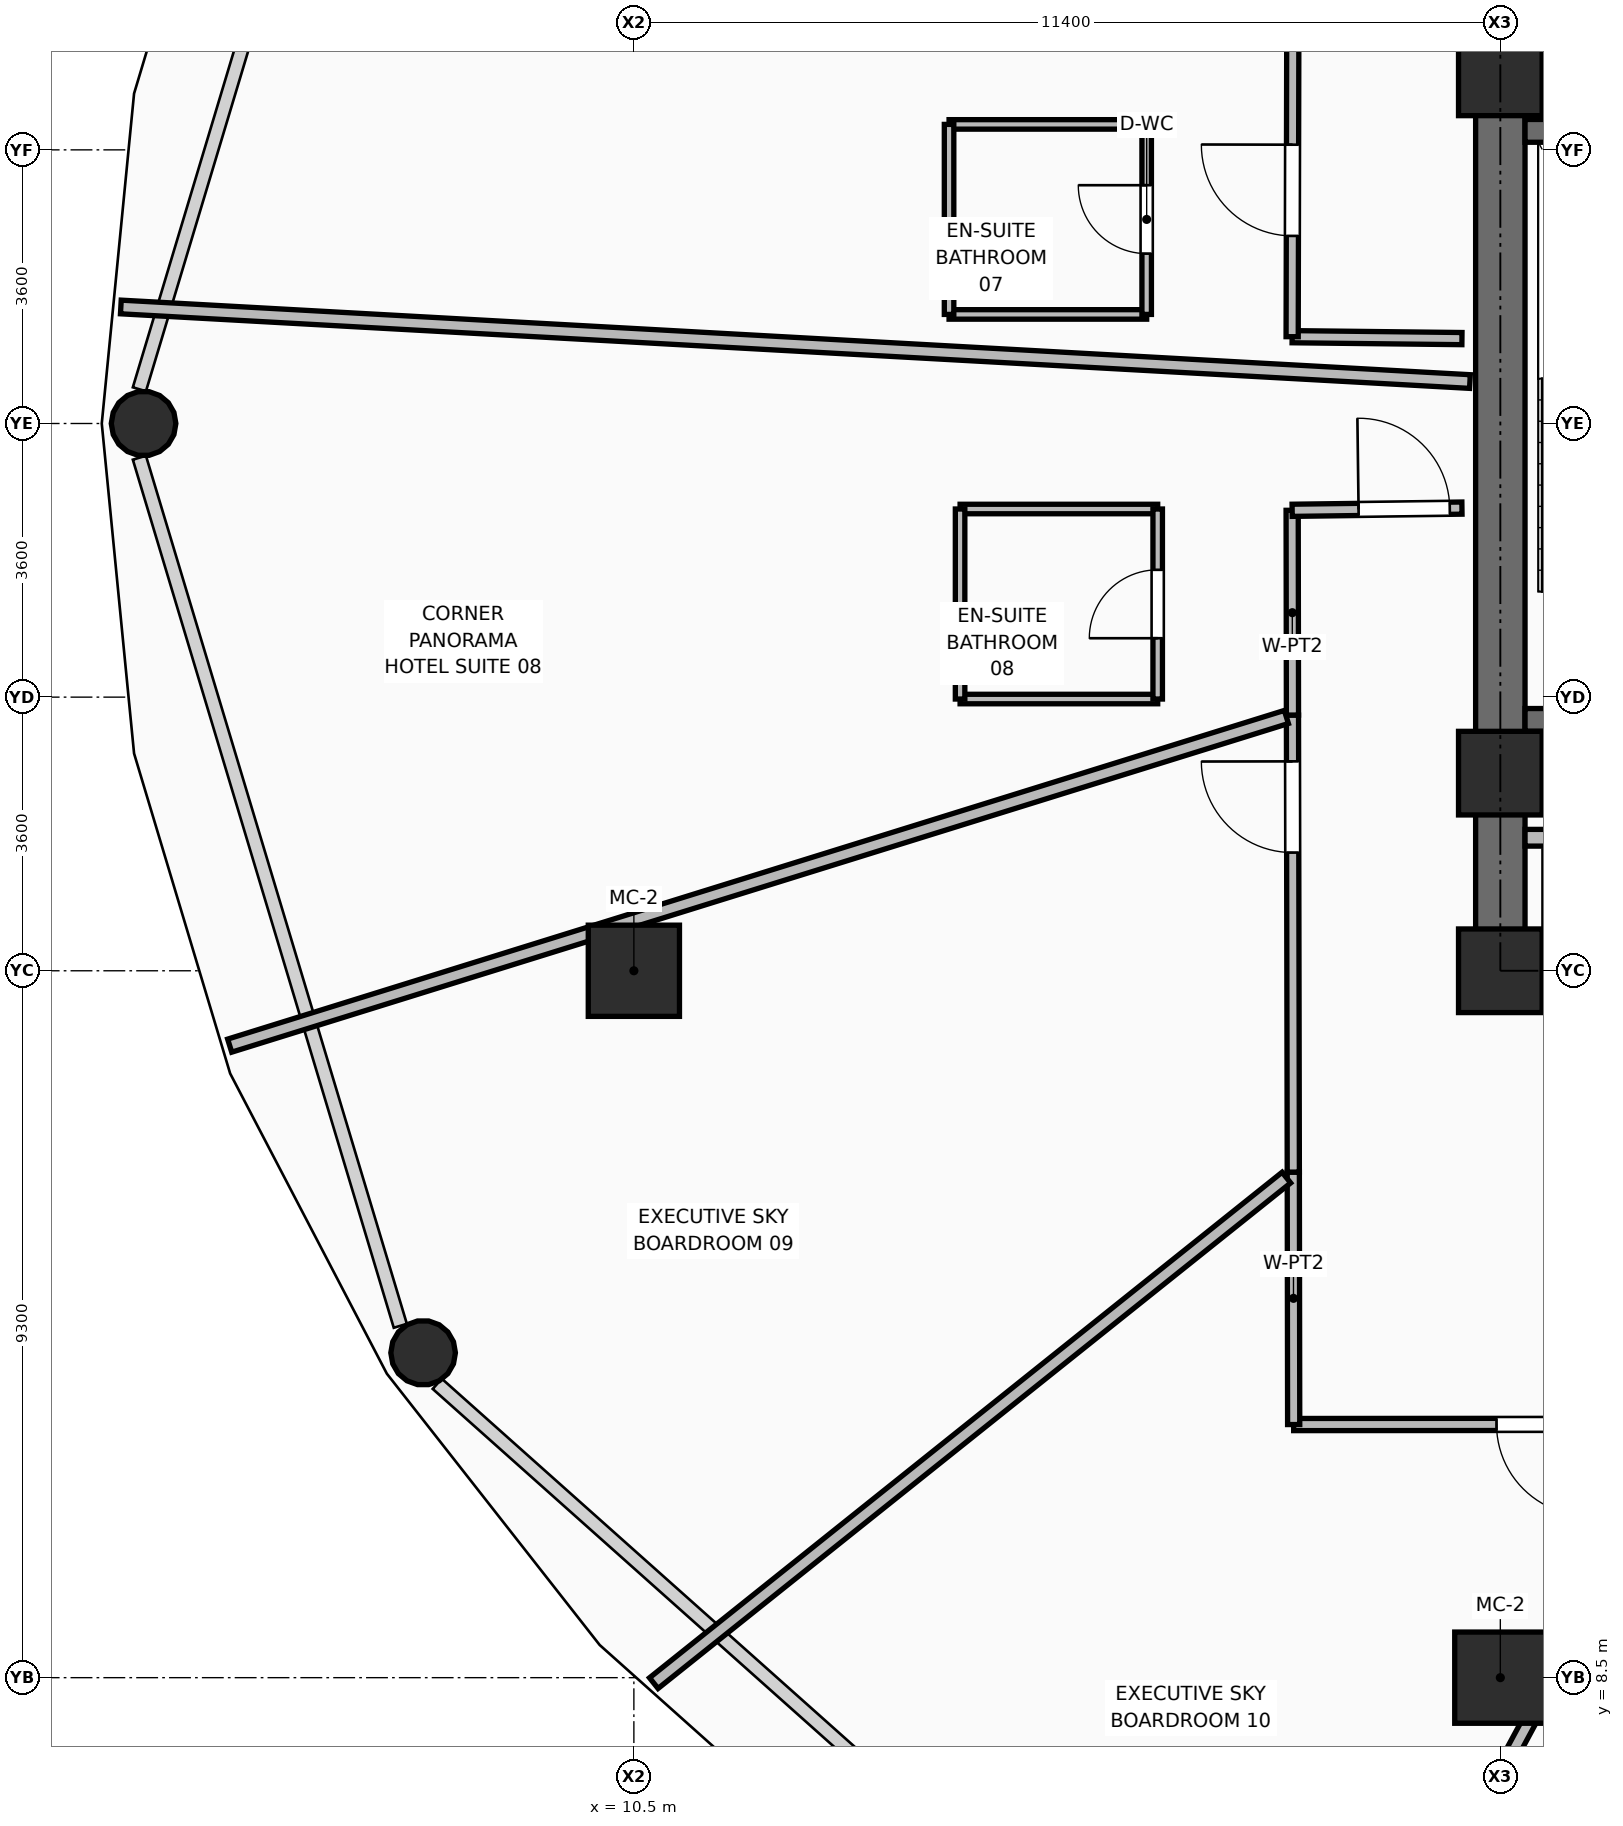
"""IFC4 building model, lengths in metres.
Left out: names, types, materials, properties, quantities, classifications, styles, units other than length and angle.
Written with IfcOpenShell. Run it as: python <this file> out.ifc"""

import sys

from ifc_helpers import new_model, si_unit, direction, frame, frame_2d, origin, origin_2d, place, context, subcontext, project, spatial, rectangle, hollow_rectangle, hollow_circle, extrude, element, fill, save


model = new_model("IFC4")
c1 = context("Model", 3, precision=1e-05, world=origin(), true_north=direction((0.0, 1.0)))
c2 = subcontext(c1, "Body", "Model", "MODEL_VIEW")
j1 = project(units=[si_unit("LENGTHUNIT", "METRE"), si_unit("PLANEANGLEUNIT", "RADIAN")], contexts=[c1])
p1 = place(None, origin())
s1 = spatial("IfcSite", under=j1, at=p1, CompositionType="ELEMENT")
p2 = place(p1, origin())
s2 = spatial("IfcBuilding", under=s1, at=p2, CompositionType="ELEMENT")
p3 = place(p2, frame((0.0, 0.0, 60.75)))
s3 = spatial("IfcBuildingStorey", under=s2, at=p3, CompositionType="ELEMENT", Elevation=60.75)
for number, where, z_axis, x_axis in (
    (1, (21.9, 17.8, 0.0), (0.0, 0.0, 1.0), (1.0, 0.0, 0.0)),
    (2, (21.9, 20.4, 0.0), (0.0, 0.0, 1.0), (1.0, 0.0, 0.0)),
    (3, (21.9, 29.6, 0.0), (0.0, 0.0, 1.0), (1.0, 0.0, 0.0)),
):
    element("IfcColumn", number, at=place(p3, frame(where, z_axis=z_axis, x_axis=x_axis)), inside=s3, PredefinedType="COLUMN", context=c2, shape_type="SweptSolid", body=[
        extrude(rectangle(XDim=1.1, YDim=1.1, at=origin_2d()), origin(), (0.0, 0.0, 1.0), 3.75),
    ])
for number, where, z_axis, x_axis in (
    (4, (21.9, 8.5, 0.0), (0.0, 0.0, 1.0), (1.0, 0.0, 0.0)),
    (5, (10.5, 17.8, 0.0), (0.0, 0.0, 1.0), (1.0, 0.0, 0.0)),
):
    element("IfcColumn", number, at=place(p3, frame(where, z_axis=z_axis, x_axis=x_axis)), inside=s3, PredefinedType="COLUMN", context=c2, shape_type="SweptSolid", body=[
        extrude(hollow_rectangle(XDim=1.2, YDim=1.2, WallThickness=0.045, at=origin_2d()), origin(), (0.0, 0.0, 1.0), 3.75),
    ])
for number, where, z_axis, x_axis in (
    (6, (4.049, 25.0, 0.0), (0.0, 0.0, 1.0), (1.0, 0.0, 0.0)),
    (7, (7.727, 12.774, 0.0), (0.0, 0.0, 1.0), (1.0, 0.0, 0.0)),
):
    element("IfcColumn", number, at=place(p3, frame(where, z_axis=z_axis, x_axis=x_axis)), inside=s3, PredefinedType="COLUMN", context=c2, shape_type="SweptSolid", body=[
        extrude(hollow_circle(Radius=0.425, WallThickness=0.04, at=origin_2d()), origin(), (0.0, 0.0, 1.0), 3.57),
    ])
p4 = place(p3, frame((21.575, 17.8, 0.0), z_axis=(0.0, 0.0, 1.0), x_axis=(1.0, 0.0, 0.0)))
e8 = element("IfcWall", 8, at=p4, inside=s3, PredefinedType="SHEAR", context=c2, shape_type="SweptSolid", body=[
    extrude(rectangle(XDim=2.175, YDim=0.65, at=frame_2d((1.087, 0.0))), origin(), (0.0, 0.0, 1.0), 3.57),
])
p5 = place(p3, frame((21.9, 18.125, 0.0), z_axis=(0.0, 0.0, 1.0), x_axis=(0.0, 1.0, 0.0)))
e9 = element("IfcWall", 9, at=p5, inside=s3, PredefinedType="SHEAR", context=c2, shape_type="SweptSolid", body=[
    extrude(rectangle(XDim=14.0, YDim=0.65, at=frame_2d((7.0, 0.0))), origin(), (0.0, 0.0, 1.0), 3.57),
])
p6 = place(p3, frame((22.225, 21.1, 0.0), z_axis=(0.0, 0.0, 1.0), x_axis=(1.0, 0.0, 0.0)))
e10 = element("IfcWall", 10, at=p6, inside=s3, PredefinedType="SHEAR", context=c2, shape_type="SweptSolid", body=[
    extrude(rectangle(XDim=3.515, YDim=0.3, at=frame_2d((1.757, 0.0))), origin(), (0.0, 0.0, 1.0), 3.57),
])
p7 = place(p6, frame((1.995, 0.0, 0.0)))
e11 = element("IfcOpeningElement", 11, at=p7, cuts=e10, PredefinedType="OPENING", context=c2, shape_type="SweptSolid", body=[
    extrude(rectangle(XDim=1.05, YDim=2.1, at=frame_2d((0.525, 1.05))), frame((0.0, 0.16, 0.0), z_axis=(0.0, -1.0, 0.0), x_axis=(1.0, 0.0, 0.0)), (0.0, 0.0, 1.0), 0.32),
])
p8 = place(p3, frame((22.225, 28.85, 0.0), z_axis=(0.0, 0.0, 1.0), x_axis=(1.0, 0.0, 0.0)))
e12 = element("IfcWall", 12, at=p8, inside=s3, PredefinedType="SHEAR", context=c2, shape_type="SweptSolid", body=[
    extrude(rectangle(XDim=3.515, YDim=0.3, at=frame_2d((1.757, 0.0))), origin(), (0.0, 0.0, 1.0), 3.57),
])
p9 = place(p3, frame((22.225, 19.55, 0.0), z_axis=(0.0, 0.0, 1.0), x_axis=(1.0, 0.0, 0.0)))
e13 = element("IfcWall", 13, at=p9, inside=s3, PredefinedType="PARTITIONING", context=c2, shape_type="SweptSolid", body=[
    extrude(rectangle(XDim=1.565, YDim=0.22, at=frame_2d((0.782, 0.0))), origin(), (0.0, 0.0, 1.0), 2.595),
])
p10 = place(p3, frame((21.395, 26.117, 0.0), z_axis=(0.0, 0.0, 1.0), x_axis=(-0.999936661747, 0.011254887571, 0.0)))
e14 = element("IfcWall", 14, at=p10, inside=s3, PredefinedType="PARTITIONING", context=c2, shape_type="SweptSolid", body=[
    extrude(rectangle(XDim=2.234, YDim=0.16, at=frame_2d((1.117, 0.0))), origin(), (0.0, 0.0, 1.0), 3.55),
])
p11 = place(p3, frame((19.161, 26.142, 0.0), z_axis=(0.0, 0.0, 1.0), x_axis=(0.002105737748, 0.999997782932, 0.0)))
e15 = element("IfcWall", 15, at=p11, inside=s3, PredefinedType="PARTITIONING", context=c2, shape_type="SweptSolid", body=[
    extrude(rectangle(XDim=4.29, YDim=0.16, at=frame_2d((2.145, 0.0))), origin(), (0.0, 0.0, 1.0), 3.55),
])
p12 = place(p11, frame((1.326, 0.0, 0.0)))
e16 = element("IfcOpeningElement", 16, at=p12, cuts=e15, PredefinedType="OPENING", context=c2, shape_type="SweptSolid", body=[
    extrude(rectangle(XDim=1.2, YDim=2.1, at=frame_2d((0.6, 1.05))), frame((0.0, 0.09, 0.0), z_axis=(0.0, -1.0, 0.0), x_axis=(1.0, 0.0, 0.0)), (0.0, 0.0, 1.0), 0.18),
])
p13 = place(p3, frame((24.39, 11.833, 0.0), z_axis=(0.0, 0.0, 1.0), x_axis=(-0.999999841836, -0.000562429607, 0.0)))
e17 = element("IfcWall", 17, at=p13, inside=s3, PredefinedType="PARTITIONING", context=c2, shape_type="SweptSolid", body=[
    extrude(rectangle(XDim=5.209, YDim=0.16, at=frame_2d((2.604, 0.0))), origin(), (0.0, 0.0, 1.0), 2.928),
])
p14 = place(p13, frame((1.34, 0.0, 0.0)))
e18 = element("IfcOpeningElement", 18, at=p14, cuts=e17, PredefinedType="OPENING", context=c2, shape_type="SweptSolid", body=[
    extrude(rectangle(XDim=1.2, YDim=2.1, at=frame_2d((0.6, 1.05))), frame((0.0, 0.09, 0.0), z_axis=(0.0, -1.0, 0.0), x_axis=(1.0, 0.0, 0.0)), (0.0, 0.0, 1.0), 0.18),
])
p15 = place(p3, frame((19.181, 11.83, 0.0), z_axis=(0.0, 0.0, 1.0), x_axis=(-0.001470370415, 0.999998919005, 0.0)))
e19 = element("IfcWall", 19, at=p15, inside=s3, PredefinedType="PARTITIONING", context=c2, shape_type="SweptSolid", body=[
    extrude(rectangle(XDim=3.321, YDim=0.16, at=frame_2d((1.66, 0.0))), origin(), (0.0, 0.0, 1.0), 3.55),
])
p16 = place(p3, frame((19.176, 15.151, 0.0), z_axis=(0.0, 0.0, 1.0), x_axis=(-0.001827037145, 0.999998330966, 0.0)))
e20 = element("IfcWall", 20, at=p16, inside=s3, PredefinedType="PARTITIONING", context=c2, shape_type="SweptSolid", body=[
    extrude(rectangle(XDim=6.013, YDim=0.16, at=frame_2d((3.007, 0.0))), origin(), (0.0, 0.0, 1.0), 2.928),
])
p17 = place(p16, frame((4.204, 0.0, 0.0)))
e21 = element("IfcOpeningElement", 21, at=p17, cuts=e20, PredefinedType="OPENING", context=c2, shape_type="SweptSolid", body=[
    extrude(rectangle(XDim=1.2, YDim=2.1, at=frame_2d((0.6, 1.05))), frame((0.0, 0.09, 0.0), z_axis=(0.0, -1.0, 0.0), x_axis=(1.0, 0.0, 0.0)), (0.0, 0.0, 1.0), 0.18),
])
p18 = place(p3, frame((19.165, 21.164, 0.0), z_axis=(0.0, 0.0, 1.0), x_axis=(-0.001540690577, 0.999998813136, 0.0)))
e22 = element("IfcWall", 22, at=p18, inside=s3, PredefinedType="PARTITIONING", context=c2, shape_type="SweptSolid", body=[
    extrude(rectangle(XDim=2.694, YDim=0.16, at=frame_2d((1.347, 0.0))), origin(), (0.0, 0.0, 1.0), 2.928),
])
p19 = place(p3, frame((19.161, 23.858, 0.0), z_axis=(0.0, 0.0, 1.0), x_axis=(0.999915458151, 0.013002943888, 0.0)))
e23 = element("IfcWall", 23, at=p19, inside=s3, PredefinedType="PARTITIONING", context=c2, shape_type="SweptSolid", body=[
    extrude(rectangle(XDim=2.234, YDim=0.16, at=frame_2d((1.117, 0.0))), origin(), (0.0, 0.0, 1.0), 3.55),
])
p20 = place(p19, frame((0.874, 0.0, 0.0)))
e24 = element("IfcOpeningElement", 24, at=p20, cuts=e23, PredefinedType="OPENING", context=c2, shape_type="SweptSolid", body=[
    extrude(rectangle(XDim=1.2, YDim=2.1, at=frame_2d((0.6, 1.05))), frame((0.0, 0.09, 0.0), z_axis=(0.0, -1.0, 0.0), x_axis=(1.0, 0.0, 0.0)), (0.0, 0.0, 1.0), 0.18),
])
p21 = place(p3, frame((21.5, 25.552, 0.0), z_axis=(0.0, 0.0, 1.0), x_axis=(-0.998476368936, 0.055180981107, 0.0)))
e25 = element("IfcWall", 25, at=p21, inside=s3, PredefinedType="PARTITIONING", context=c2, shape_type="SweptSolid", body=[
    extrude(rectangle(XDim=17.777, YDim=0.18, at=frame_2d((8.889, 0.0))), origin(), (0.0, 0.0, 1.0), 2.595),
])
p22 = place(p3, frame((19.085, 21.139, 0.0), z_axis=(0.0, 0.0, 1.0), x_axis=(-0.954884570259, -0.296977200271, 0.0)))
e26 = element("IfcWall", 26, at=p22, inside=s3, PredefinedType="PARTITIONING", context=c2, shape_type="SweptSolid", body=[
    extrude(rectangle(XDim=14.56, YDim=0.18, at=frame_2d((7.28, 0.0))), origin(), (0.0, 0.0, 1.0), 2.775),
])
p23 = place(p3, frame((19.085, 15.079, 0.0), z_axis=(0.0, 0.0, 1.0), x_axis=(-0.781201807071, -0.624278572938, 0.0)))
e27 = element("IfcWall", 27, at=p23, inside=s3, PredefinedType="PARTITIONING", context=c2, shape_type="SweptSolid", body=[
    extrude(rectangle(XDim=10.654, YDim=0.18, at=frame_2d((5.327, 0.0))), origin(), (0.0, 0.0, 1.0), 2.775),
])
p24 = place(p3, frame((24.345, 11.75, 0.0), z_axis=(0.0, 0.0, 1.0), x_axis=(-0.475165367646, -0.879896512887, 0.0)))
e28 = element("IfcWall", 28, at=p24, inside=s3, PredefinedType="PARTITIONING", context=c2, shape_type="SweptSolid", body=[
    extrude(rectangle(XDim=10.34, YDim=0.18, at=frame_2d((5.17, 0.0))), origin(), (0.0, 0.0, 1.0), 2.775),
])
for number, where, z_axis, x_axis in (
    (29, (14.647, 26.435, 0.0), (0.0, 0.0, 1.0), (1.0, 0.0, 0.0)),
    (30, (14.647, 28.935, 0.0), (0.0, 0.0, 1.0), (1.0, 0.0, 0.0)),
):
    element("IfcWall", number, at=place(p3, frame(where, z_axis=z_axis, x_axis=x_axis)), inside=s3, PredefinedType="PARTITIONING", context=c2, shape_type="SweptSolid", body=[
        extrude(rectangle(XDim=2.6, YDim=0.125, at=frame_2d((1.3, 0.0))), origin(), (0.0, 0.0, 1.0), 3.55),
    ])
p25 = place(p3, frame((14.647, 26.435, 0.0), z_axis=(0.0, 0.0, 1.0), x_axis=(0.0, 1.0, 0.0)))
e31 = element("IfcWall", 31, at=p25, inside=s3, PredefinedType="PARTITIONING", context=c2, shape_type="SweptSolid", body=[
    extrude(rectangle(XDim=2.5, YDim=0.125, at=frame_2d((1.25, 0.0))), origin(), (0.0, 0.0, 1.0), 3.55),
])
p26 = place(p3, frame((17.247, 26.435, 0.0), z_axis=(0.0, 0.0, 1.0), x_axis=(0.0, 1.0, 0.0)))
e32 = element("IfcWall", 32, at=p26, inside=s3, PredefinedType="PARTITIONING", context=c2, shape_type="SweptSolid", body=[
    extrude(rectangle(XDim=2.5, YDim=0.125, at=frame_2d((1.25, 0.0))), origin(), (0.0, 0.0, 1.0), 3.55),
])
p27 = place(p26, frame((0.8, 0.0, 0.0)))
e33 = element("IfcOpeningElement", 33, at=p27, cuts=e32, PredefinedType="OPENING", context=c2, shape_type="SweptSolid", body=[
    extrude(rectangle(XDim=0.9, YDim=2.1, at=frame_2d((0.45, 1.05))), frame((0.0, 0.073, 0.0), z_axis=(0.0, -1.0, 0.0), x_axis=(1.0, 0.0, 0.0)), (0.0, 0.0, 1.0), 0.145),
])
p28 = place(p3, frame((14.792, 21.375, 0.0), z_axis=(0.0, 0.0, 1.0), x_axis=(1.0, 0.0, 0.0)))
e34 = element("IfcWall", 34, at=p28, inside=s3, PredefinedType="PARTITIONING", context=c2, shape_type="SweptSolid", body=[
    extrude(rectangle(XDim=2.6, YDim=0.125, at=frame_2d((1.3, 0.0))), origin(), (0.0, 0.0, 1.0), 2.928),
])
p29 = place(p3, frame((14.792, 23.875, 0.0), z_axis=(0.0, 0.0, 1.0), x_axis=(1.0, 0.0, 0.0)))
e35 = element("IfcWall", 35, at=p29, inside=s3, PredefinedType="PARTITIONING", context=c2, shape_type="SweptSolid", body=[
    extrude(rectangle(XDim=2.6, YDim=0.125, at=frame_2d((1.3, 0.0))), origin(), (0.0, 0.0, 1.0), 3.55),
])
p30 = place(p3, frame((14.792, 21.375, 0.0), z_axis=(0.0, 0.0, 1.0), x_axis=(0.0, 1.0, 0.0)))
e36 = element("IfcWall", 36, at=p30, inside=s3, PredefinedType="PARTITIONING", context=c2, shape_type="SweptSolid", body=[
    extrude(rectangle(XDim=2.5, YDim=0.125, at=frame_2d((1.25, 0.0))), origin(), (0.0, 0.0, 1.0), 2.928),
])
p31 = place(p3, frame((17.392, 21.375, 0.0), z_axis=(0.0, 0.0, 1.0), x_axis=(0.0, 1.0, 0.0)))
e37 = element("IfcWall", 37, at=p31, inside=s3, PredefinedType="PARTITIONING", context=c2, shape_type="SweptSolid", body=[
    extrude(rectangle(XDim=2.5, YDim=0.125, at=frame_2d((1.25, 0.0))), origin(), (0.0, 0.0, 1.0), 2.928),
])
p32 = place(p31, frame((0.8, 0.0, 0.0)))
e38 = element("IfcOpeningElement", 38, at=p32, cuts=e37, PredefinedType="OPENING", context=c2, shape_type="SweptSolid", body=[
    extrude(rectangle(XDim=0.9, YDim=2.1, at=frame_2d((0.45, 1.05))), frame((0.0, 0.073, 0.0), z_axis=(0.0, -1.0, 0.0), x_axis=(1.0, 0.0, 0.0)), (0.0, 0.0, 1.0), 0.145),
])
p33 = place(p27, origin())
e39 = element("IfcDoor", 39, at=p33, inside=s3, OperationType="SINGLE_SWING_RIGHT", PredefinedType="DOOR", context=c2, shape_type="SweptSolid", body=[
    extrude(rectangle(XDim=0.9, YDim=2.1, at=frame_2d((0.45, 1.05))), frame((0.0, 0.025, 0.0), z_axis=(0.0, -1.0, 0.0), x_axis=(1.0, 0.0, 0.0)), (0.0, 0.0, 1.0), 0.05),
])
fill(e33, e39)
p34 = place(p12, origin())
e40 = element("IfcDoor", 40, at=p34, inside=s3, OperationType="SINGLE_SWING_RIGHT", PredefinedType="DOOR", context=c2, shape_type="SweptSolid", body=[
    extrude(rectangle(XDim=1.2, YDim=2.1, at=frame_2d((0.6, 1.05))), frame((0.0, 0.025, 0.0), z_axis=(0.0, -1.0, 0.0), x_axis=(1.0, 0.0, 0.0)), (0.0, 0.0, 1.0), 0.05),
])
fill(e16, e40)
p35 = place(p32, origin())
e41 = element("IfcDoor", 41, at=p35, inside=s3, OperationType="SINGLE_SWING_LEFT", PredefinedType="DOOR", context=c2, shape_type="SweptSolid", body=[
    extrude(rectangle(XDim=0.9, YDim=2.1, at=frame_2d((0.45, 1.05))), frame((0.0, 0.025, 0.0), z_axis=(0.0, -1.0, 0.0), x_axis=(1.0, 0.0, 0.0)), (0.0, 0.0, 1.0), 0.05),
])
fill(e38, e41)
p36 = place(p20, origin())
e42 = element("IfcDoor", 42, at=p36, inside=s3, OperationType="SINGLE_SWING_LEFT", PredefinedType="DOOR", context=c2, shape_type="SweptSolid", body=[
    extrude(rectangle(XDim=1.2, YDim=2.1, at=frame_2d((0.6, 1.05))), frame((0.0, 0.025, 0.0), z_axis=(0.0, -1.0, 0.0), x_axis=(1.0, 0.0, 0.0)), (0.0, 0.0, 1.0), 0.05),
])
fill(e24, e42)
p37 = place(p17, origin())
e43 = element("IfcDoor", 43, at=p37, inside=s3, OperationType="SINGLE_SWING_RIGHT", PredefinedType="DOOR", context=c2, shape_type="SweptSolid", body=[
    extrude(rectangle(XDim=1.2, YDim=2.1, at=frame_2d((0.6, 1.05))), frame((0.0, 0.025, 0.0), z_axis=(0.0, -1.0, 0.0), x_axis=(1.0, 0.0, 0.0)), (0.0, 0.0, 1.0), 0.05),
])
fill(e21, e43)
p38 = place(p14, origin())
e44 = element("IfcDoor", 44, at=p38, inside=s3, OperationType="SINGLE_SWING_LEFT", PredefinedType="DOOR", context=c2, shape_type="SweptSolid", body=[
    extrude(rectangle(XDim=1.2, YDim=2.1, at=frame_2d((0.6, 1.05))), frame((0.0, 0.025, 0.0), z_axis=(0.0, -1.0, 0.0), x_axis=(1.0, 0.0, 0.0)), (0.0, 0.0, 1.0), 0.05),
])
fill(e18, e44)
save(model, sys.argv[1])
